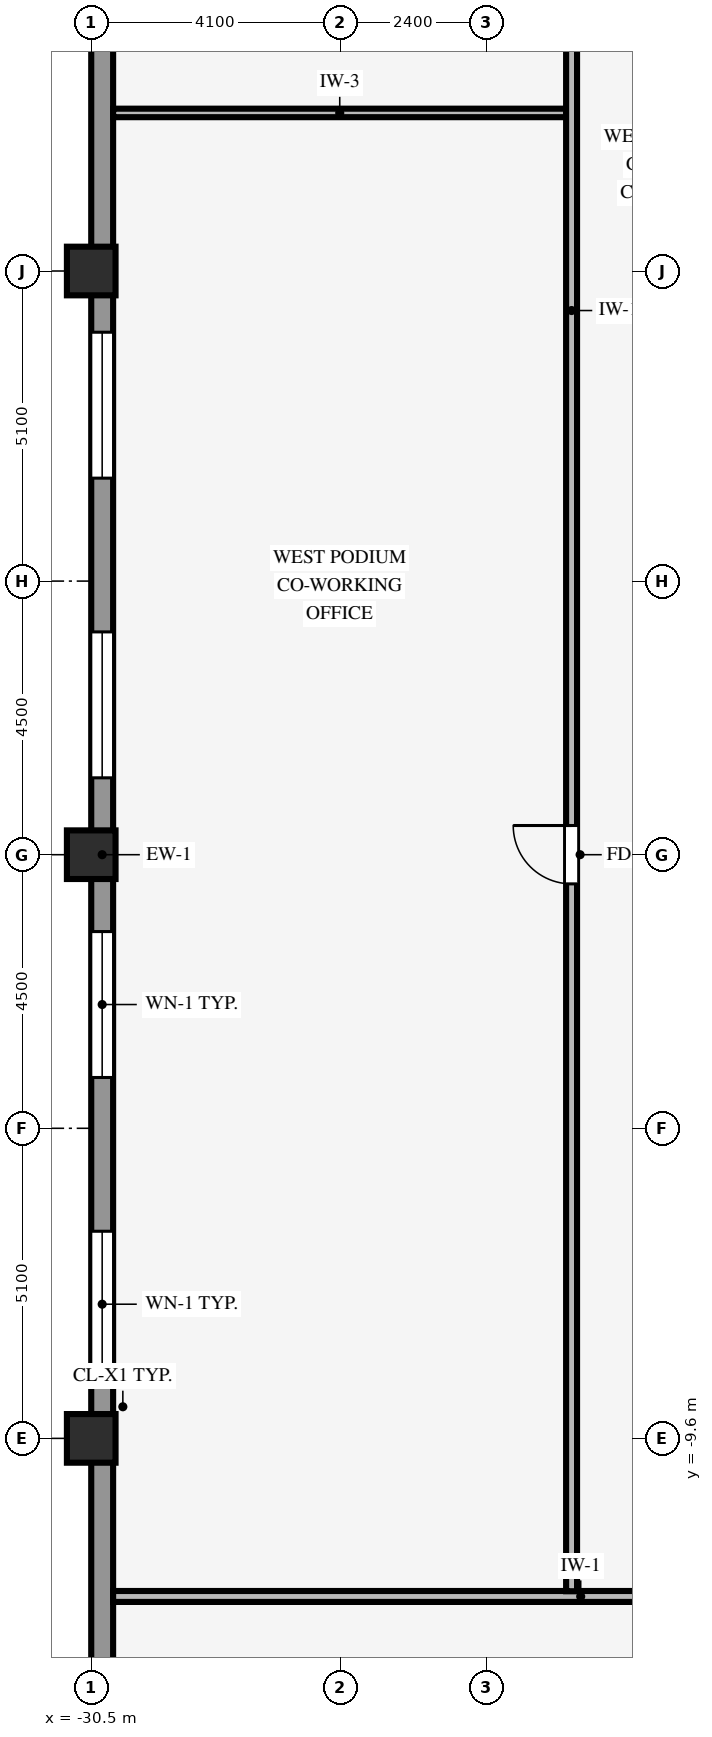
"""IFC4 building model, lengths in metres.
Left out: names, types, materials, properties, quantities, classifications, styles, units other than length and angle.
Written with IfcOpenShell. Run it as: python <this file> out.ifc"""

import sys

from ifc_helpers import new_model, si_unit, direction, frame, frame_2d, origin, origin_2d, place, context, subcontext, project, spatial, rectangle, hollow_rectangle, extrude, source, transform, mapped, element, fill, save


model = new_model("IFC4")
c1 = context("Model", 3, precision=1e-05, world=origin(), true_north=direction((0.0, 1.0)))
c2 = subcontext(c1, "Body", "Model", "MODEL_VIEW")
j1 = project(units=[si_unit("LENGTHUNIT", "METRE"), si_unit("PLANEANGLEUNIT", "RADIAN")], contexts=[c1])
p1 = place(None, origin())
s1 = spatial("IfcSite", under=j1, at=p1, CompositionType="ELEMENT")
p2 = place(p1, origin())
s2 = spatial("IfcBuilding", under=s1, at=p2, CompositionType="ELEMENT")
p3 = place(p2, frame((0.0, 0.0, 13.8)))
s3 = spatial("IfcBuildingStorey", under=s2, at=p3, CompositionType="ELEMENT", Elevation=13.8)
for number, where, z_axis, x_axis in (
    (1, (-30.5, -9.6, 0.0), (0.0, 0.0, 1.0), (1.0, 0.0, 0.0)),
    (2, (-30.5, 0.0, 0.0), (0.0, 0.0, 1.0), (1.0, 0.0, 0.0)),
    (3, (-30.5, 9.6, 0.0), (0.0, 0.0, 1.0), (1.0, 0.0, 0.0)),
):
    element("IfcColumn", number, at=place(p3, frame(where, z_axis=z_axis, x_axis=x_axis)), inside=s3, PredefinedType="COLUMN", context=c2, shape_type="SweptSolid", body=[
        extrude(hollow_rectangle(XDim=0.8, YDim=0.8, WallThickness=0.055, InnerFilletRadius=0.055, OuterFilletRadius=0.11, at=origin_2d()), origin(), (0.0, 0.0, 1.0), 4.2),
    ])
p4 = place(p3, frame((-30.32, -25.644, 0.0), z_axis=(0.0, 0.0, 1.0), x_axis=(0.0, 1.0, 0.0)))
e4 = element("IfcWall", 4, at=p4, inside=s3, PredefinedType="STANDARD", context=c2, shape_type="SweptSolid", body=[
    extrude(rectangle(XDim=51.288, YDim=0.36, at=frame_2d((25.644, 0.0))), origin(), (0.0, 0.0, 1.0), 3.535),
])
p5 = place(p4, frame((2.264, 0.0, 0.85)))
e5 = element("IfcOpeningElement", 5, at=p5, cuts=e4, PredefinedType="OPENING", context=c2, shape_type="SweptSolid", body=[
    extrude(rectangle(XDim=2.4, YDim=2.45, at=frame_2d((1.2, 1.225))), frame((0.0, 0.19, 0.0), z_axis=(0.0, -1.0, 0.0), x_axis=(1.0, 0.0, 0.0)), (0.0, 0.0, 1.0), 0.38),
])
p6 = place(p4, frame((17.051, 0.0, 0.85)))
e6 = element("IfcOpeningElement", 6, at=p6, cuts=e4, PredefinedType="OPENING", context=c2, shape_type="SweptSolid", body=[
    extrude(rectangle(XDim=2.4, YDim=2.45, at=frame_2d((1.2, 1.225))), frame((0.0, 0.19, 0.0), z_axis=(0.0, -1.0, 0.0), x_axis=(1.0, 0.0, 0.0)), (0.0, 0.0, 1.0), 0.38),
])
p7 = place(p4, frame((21.979, 0.0, 0.85)))
e7 = element("IfcOpeningElement", 7, at=p7, cuts=e4, PredefinedType="OPENING", context=c2, shape_type="SweptSolid", body=[
    extrude(rectangle(XDim=2.4, YDim=2.45, at=frame_2d((1.2, 1.225))), frame((0.0, 0.19, 0.0), z_axis=(0.0, -1.0, 0.0), x_axis=(1.0, 0.0, 0.0)), (0.0, 0.0, 1.0), 0.38),
])
p8 = place(p4, frame((26.908, 0.0, 0.85)))
e8 = element("IfcOpeningElement", 8, at=p8, cuts=e4, PredefinedType="OPENING", context=c2, shape_type="SweptSolid", body=[
    extrude(rectangle(XDim=2.4, YDim=2.45, at=frame_2d((1.2, 1.225))), frame((0.0, 0.19, 0.0), z_axis=(0.0, -1.0, 0.0), x_axis=(1.0, 0.0, 0.0)), (0.0, 0.0, 1.0), 0.38),
])
p9 = place(p4, frame((31.837, 0.0, 0.85)))
e9 = element("IfcOpeningElement", 9, at=p9, cuts=e4, PredefinedType="OPENING", context=c2, shape_type="SweptSolid", body=[
    extrude(rectangle(XDim=2.4, YDim=2.45, at=frame_2d((1.2, 1.225))), frame((0.0, 0.19, 0.0), z_axis=(0.0, -1.0, 0.0), x_axis=(1.0, 0.0, 0.0)), (0.0, 0.0, 1.0), 0.38),
])
p10 = place(p4, frame((46.624, 0.0, 0.85)))
e10 = element("IfcOpeningElement", 10, at=p10, cuts=e4, PredefinedType="OPENING", context=c2, shape_type="SweptSolid", body=[
    extrude(rectangle(XDim=2.4, YDim=2.45, at=frame_2d((1.2, 1.225))), frame((0.0, 0.19, 0.0), z_axis=(0.0, -1.0, 0.0), x_axis=(1.0, 0.0, 0.0)), (0.0, 0.0, 1.0), 0.38),
])
p11 = place(p3, frame((-30.14, -12.2, 0.0), z_axis=(0.0, 0.0, 1.0), x_axis=(1.0, 0.0, 0.0)))
e11 = element("IfcWall", 11, at=p11, inside=s3, PredefinedType="PARTITIONING", context=c2, shape_type="SweptSolid", body=[
    extrude(rectangle(XDim=22.28, YDim=0.18, at=frame_2d((11.14, 0.0))), origin(), (0.0, 0.0, 1.0), 4.19),
])
p12 = place(p11, frame((15.83, 0.0, 0.0)))
e12 = element("IfcOpeningElement", 12, at=p12, cuts=e11, PredefinedType="OPENING", context=c2, shape_type="SweptSolid", body=[
    extrude(rectangle(XDim=0.96, YDim=2.1, at=frame_2d((0.48, 1.05))), frame((0.0, 0.1, 0.0), z_axis=(0.0, -1.0, 0.0), x_axis=(1.0, 0.0, 0.0)), (0.0, 0.0, 1.0), 0.2),
])
p13 = place(p3, frame((-30.14, 12.2, 0.0), z_axis=(0.0, 0.0, 1.0), x_axis=(1.0, 0.0, 0.0)))
e13 = element("IfcWall", 13, at=p13, inside=s3, PredefinedType="PARTITIONING", context=c2, shape_type="SweptSolid", body=[
    extrude(rectangle(XDim=7.454, YDim=0.14, at=frame_2d((3.727, 0.0))), origin(), (0.0, 0.0, 1.0), 4.19),
])
p14 = place(p3, frame((-22.6, -12.114, 0.0), z_axis=(0.0, 0.0, 1.0), x_axis=(0.0, 1.0, 0.0)))
e14 = element("IfcWall", 14, at=p14, inside=s3, PredefinedType="PARTITIONING", context=c2, shape_type="SweptSolid", body=[
    extrude(rectangle(XDim=37.919, YDim=0.18, at=frame_2d((18.959, 0.0))), origin(), (0.0, 0.0, 1.0), 4.19),
])
p15 = place(p14, frame((11.634, 0.0, 0.0)))
e15 = element("IfcOpeningElement", 15, at=p15, cuts=e14, PredefinedType="OPENING", context=c2, shape_type="SweptSolid", body=[
    extrude(rectangle(XDim=0.96, YDim=2.1, at=frame_2d((0.48, 1.05))), frame((0.0, 0.1, 0.0), z_axis=(0.0, -1.0, 0.0), x_axis=(1.0, 0.0, 0.0)), (0.0, 0.0, 1.0), 0.2),
])
p16 = place(p14, frame((29.534, 0.0, 0.0)))
e16 = element("IfcOpeningElement", 16, at=p16, cuts=e14, PredefinedType="OPENING", context=c2, shape_type="SweptSolid", body=[
    extrude(rectangle(XDim=0.96, YDim=2.1, at=frame_2d((0.48, 1.05))), frame((0.0, 0.1, 0.0), z_axis=(0.0, -1.0, 0.0), x_axis=(1.0, 0.0, 0.0)), (0.0, 0.0, 1.0), 0.2),
])
m1 = source(origin(), c2, "Body", "SweptSolid", [
    extrude(rectangle(XDim=2.4, YDim=2.45, at=frame_2d((1.2, 1.225))), frame((0.0, 0.03, 0.0), z_axis=(0.0, -1.0, 0.0), x_axis=(1.0, 0.0, 0.0)), (0.0, 0.0, 1.0), 0.06),
])
p17 = place(p6, origin())
e17 = element("IfcWindow", 17, at=p17, inside=s3, PartitioningType="SINGLE_PANEL", PredefinedType="WINDOW", context=c2, shape_type="MappedRepresentation", body=[
    mapped(m1, transform((0.0, 0.0, 0.0), scale=1.0)),
])
fill(e6, e17)
p18 = place(p7, origin())
e18 = element("IfcWindow", 18, at=p18, inside=s3, PartitioningType="SINGLE_PANEL", PredefinedType="WINDOW", context=c2, shape_type="MappedRepresentation", body=[
    mapped(m1, transform((0.0, 0.0, 0.0), scale=1.0)),
])
fill(e7, e18)
p19 = place(p8, origin())
e19 = element("IfcWindow", 19, at=p19, inside=s3, PartitioningType="SINGLE_PANEL", PredefinedType="WINDOW", context=c2, shape_type="MappedRepresentation", body=[
    mapped(m1, transform((0.0, 0.0, 0.0), scale=1.0)),
])
fill(e8, e19)
p20 = place(p9, origin())
e20 = element("IfcWindow", 20, at=p20, inside=s3, PartitioningType="SINGLE_PANEL", PredefinedType="WINDOW", context=c2, shape_type="MappedRepresentation", body=[
    mapped(m1, transform((0.0, 0.0, 0.0), scale=1.0)),
])
fill(e9, e20)
m2 = source(origin(), c2, "Body", "SweptSolid", [
    extrude(rectangle(XDim=0.96, YDim=2.1, at=frame_2d((0.48, 1.05))), frame((0.0, 0.025, 0.0), z_axis=(0.0, -1.0, 0.0), x_axis=(1.0, 0.0, 0.0)), (0.0, 0.0, 1.0), 0.05),
])
p21 = place(p15, origin())
e21 = element("IfcDoor", 21, at=p21, inside=s3, OperationType="SINGLE_SWING_RIGHT", PredefinedType="DOOR", context=c2, shape_type="MappedRepresentation", body=[
    mapped(m2, transform((0.0, 0.0, 0.0), scale=1.0)),
])
fill(e15, e21)
save(model, sys.argv[1])
